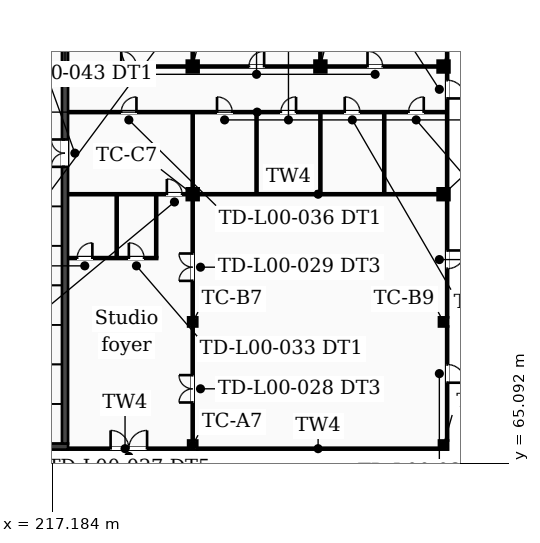
"""IFC4 building model, lengths in metres.
Left out: names, types, materials, properties, quantities, classifications, styles, units other than length and angle.
Written with IfcOpenShell. Run it as: python <this file> out.ifc"""

import sys

from ifc_helpers import new_model, si_unit, direction, frame, frame_2d, origin, origin_2d, place, context, subcontext, project, spatial, rectangle, extrude, element, fill, save


model = new_model("IFC4")
c1 = context("Model", 3, precision=1e-05, world=origin(), true_north=direction((0.0, 1.0)))
c2 = subcontext(c1, "Body", "Model", "MODEL_VIEW")
j1 = project(units=[si_unit("LENGTHUNIT", "METRE"), si_unit("PLANEANGLEUNIT", "RADIAN")], contexts=[c1])
p1 = place(None, origin())
s1 = spatial("IfcSite", under=j1, at=p1, CompositionType="ELEMENT")
p2 = place(p1, origin())
s2 = spatial("IfcBuilding", under=s1, at=p2, CompositionType="ELEMENT")
p3 = place(p2, origin())
s3 = spatial("IfcBuildingStorey", under=s2, at=p3, CompositionType="ELEMENT", Elevation=0.0)
p4 = place(p3, frame((217.8, 66.062, 0.0), z_axis=(0.0, 0.0, 1.0), x_axis=(1.0, 0.0, 0.0)))
e1 = element("IfcWall", 1, at=p4, inside=s3, PredefinedType="PARTITIONING", context=c2, shape_type="SweptSolid", body=[
    extrude(rectangle(XDim=8.3, YDim=0.125, at=frame_2d((4.15, 0.0))), origin(), (0.0, 0.0, 1.0), 8.7),
])
p5 = place(p4, frame((3.2, 0.0, 0.0)))
e2 = element("IfcOpeningElement", 2, at=p5, cuts=e1, PredefinedType="OPENING", context=c2, shape_type="SweptSolid", body=[
    extrude(rectangle(XDim=2.4, YDim=2.4, at=frame_2d((1.2, 1.2))), frame((0.0, 0.073, 0.0), z_axis=(0.0, -1.0, 0.0), x_axis=(1.0, 0.0, 0.0)), (0.0, 0.0, 1.0), 0.145),
])
p6 = place(p3, frame((226.7, 66.062, 0.0), z_axis=(0.0, 0.0, 1.0), x_axis=(1.0, 0.0, 0.0)))
e3 = element("IfcWall", 3, at=p6, inside=s3, PredefinedType="PARTITIONING", context=c2, shape_type="SweptSolid", body=[
    extrude(rectangle(XDim=15.9, YDim=0.125, at=frame_2d((7.95, 0.0))), origin(), (0.0, 0.0, 1.0), 7.5),
])
p7 = place(p3, frame((192.6, 66.2, 0.0), z_axis=(0.0, 0.0, 1.0), x_axis=(1.0, 0.0, 0.0)))
e4 = element("IfcWall", 4, at=p7, inside=s3, PredefinedType="SOLIDWALL", context=c2, shape_type="SweptSolid", body=[
    extrude(rectangle(XDim=25.6, YDim=0.4, at=frame_2d((12.8, 0.0))), origin(), (0.0, 0.0, 1.0), 8.7),
])
p8 = place(p3, frame((218.2, 78.6, 0.0), z_axis=(0.0, 0.0, 1.0), x_axis=(1.0, 0.0, 0.0)))
e5 = element("IfcWall", 5, at=p8, inside=s3, PredefinedType="PARTITIONING", context=c2, shape_type="SweptSolid", body=[
    extrude(rectangle(XDim=5.863, YDim=0.125, at=frame_2d((2.931, 0.0))), origin(), (0.0, 0.0, 1.0), 8.7),
])
p9 = place(p8, frame((0.6, 0.0, 0.0)))
e6 = element("IfcOpeningElement", 6, at=p9, cuts=e5, PredefinedType="OPENING", context=c2, shape_type="SweptSolid", body=[
    extrude(rectangle(XDim=1.0, YDim=2.1, at=frame_2d((0.5, 1.05))), frame((0.0, 0.073, 0.0), z_axis=(0.0, -1.0, 0.0), x_axis=(1.0, 0.0, 0.0)), (0.0, 0.0, 1.0), 0.145),
])
p10 = place(p8, frame((4.0, 0.0, 0.0)))
e7 = element("IfcOpeningElement", 7, at=p10, cuts=e5, PredefinedType="OPENING", context=c2, shape_type="SweptSolid", body=[
    extrude(rectangle(XDim=1.0, YDim=2.1, at=frame_2d((0.5, 1.05))), frame((0.0, 0.073, 0.0), z_axis=(0.0, -1.0, 0.0), x_axis=(1.0, 0.0, 0.0)), (0.0, 0.0, 1.0), 0.145),
])
p11 = place(p3, frame((218.2, 82.8, 0.0), z_axis=(0.0, 0.0, 1.0), x_axis=(1.0, 0.0, 0.0)))
e8 = element("IfcWall", 8, at=p11, inside=s3, PredefinedType="PARTITIONING", context=c2, shape_type="SweptSolid", body=[
    extrude(rectangle(XDim=7.9, YDim=0.125, at=frame_2d((3.95, 0.0))), origin(), (0.0, 0.0, 1.0), 8.7),
])
p12 = place(p11, frame((6.5, 0.0, 0.0)))
e9 = element("IfcOpeningElement", 9, at=p12, cuts=e8, PredefinedType="OPENING", context=c2, shape_type="SweptSolid", body=[
    extrude(rectangle(XDim=1.0, YDim=2.1, at=frame_2d((0.5, 1.05))), frame((0.0, 0.073, 0.0), z_axis=(0.0, -1.0, 0.0), x_axis=(1.0, 0.0, 0.0)), (0.0, 0.0, 1.0), 0.145),
])
p13 = place(p3, frame((226.7, 82.8, 0.0), z_axis=(0.0, 0.0, 1.0), x_axis=(1.0, 0.0, 0.0)))
e10 = element("IfcWall", 10, at=p13, inside=s3, PredefinedType="PARTITIONING", context=c2, shape_type="SweptSolid", body=[
    extrude(rectangle(XDim=15.9, YDim=0.125, at=frame_2d((7.95, 0.0))), origin(), (0.0, 0.0, 1.0), 7.5),
])
p14 = place(p3, frame((218.2, 88.2, 0.0), z_axis=(0.0, 0.0, 1.0), x_axis=(1.0, 0.0, 0.0)))
e11 = element("IfcWall", 11, at=p14, inside=s3, PredefinedType="PARTITIONING", context=c2, shape_type="SweptSolid", body=[
    extrude(rectangle(XDim=24.875, YDim=0.125, at=frame_2d((12.438, 0.0))), origin(), (0.0, 0.0, 1.0), 8.7),
])
p15 = place(p14, frame((3.5, 0.0, 0.0)))
e12 = element("IfcOpeningElement", 12, at=p15, cuts=e11, PredefinedType="OPENING", context=c2, shape_type="SweptSolid", body=[
    extrude(rectangle(XDim=1.0, YDim=2.1, at=frame_2d((0.5, 1.05))), frame((0.0, 0.073, 0.0), z_axis=(0.0, -1.0, 0.0), x_axis=(1.0, 0.0, 0.0)), (0.0, 0.0, 1.0), 0.145),
])
p16 = place(p14, frame((9.8, 0.0, 0.0)))
e13 = element("IfcOpeningElement", 13, at=p16, cuts=e11, PredefinedType="OPENING", context=c2, shape_type="SweptSolid", body=[
    extrude(rectangle(XDim=1.0, YDim=2.1, at=frame_2d((0.5, 1.05))), frame((0.0, 0.073, 0.0), z_axis=(0.0, -1.0, 0.0), x_axis=(1.0, 0.0, 0.0)), (0.0, 0.0, 1.0), 0.145),
])
p17 = place(p14, frame((14.0, 0.0, 0.0)))
e14 = element("IfcOpeningElement", 14, at=p17, cuts=e11, PredefinedType="OPENING", context=c2, shape_type="SweptSolid", body=[
    extrude(rectangle(XDim=1.0, YDim=2.1, at=frame_2d((0.5, 1.05))), frame((0.0, 0.073, 0.0), z_axis=(0.0, -1.0, 0.0), x_axis=(1.0, 0.0, 0.0)), (0.0, 0.0, 1.0), 0.145),
])
p18 = place(p14, frame((18.2, 0.0, 0.0)))
e15 = element("IfcOpeningElement", 15, at=p18, cuts=e11, PredefinedType="OPENING", context=c2, shape_type="SweptSolid", body=[
    extrude(rectangle(XDim=1.0, YDim=2.1, at=frame_2d((0.5, 1.05))), frame((0.0, 0.073, 0.0), z_axis=(0.0, -1.0, 0.0), x_axis=(1.0, 0.0, 0.0)), (0.0, 0.0, 1.0), 0.145),
])
p19 = place(p14, frame((22.4, 0.0, 0.0)))
e16 = element("IfcOpeningElement", 16, at=p19, cuts=e11, PredefinedType="OPENING", context=c2, shape_type="SweptSolid", body=[
    extrude(rectangle(XDim=1.0, YDim=2.1, at=frame_2d((0.5, 1.05))), frame((0.0, 0.073, 0.0), z_axis=(0.0, -1.0, 0.0), x_axis=(1.0, 0.0, 0.0)), (0.0, 0.0, 1.0), 0.145),
])
p20 = place(p3, frame((218.2, 91.2, 0.0), z_axis=(0.0, 0.0, 1.0), x_axis=(1.0, 0.0, 0.0)))
e17 = element("IfcWall", 17, at=p20, inside=s3, PredefinedType="PARTITIONING", context=c2, shape_type="SweptSolid", body=[
    extrude(rectangle(XDim=7.9, YDim=0.125, at=frame_2d((3.95, 0.0))), origin(), (0.0, 0.0, 1.0), 8.7),
])
p21 = place(p20, frame((3.5, 0.0, 0.0)))
e18 = element("IfcOpeningElement", 18, at=p21, cuts=e17, PredefinedType="OPENING", context=c2, shape_type="SweptSolid", body=[
    extrude(rectangle(XDim=1.0, YDim=2.1, at=frame_2d((0.5, 1.05))), frame((0.0, 0.073, 0.0), z_axis=(0.0, -1.0, 0.0), x_axis=(1.0, 0.0, 0.0)), (0.0, 0.0, 1.0), 0.145),
])
p22 = place(p3, frame((226.7, 91.2, 0.0), z_axis=(0.0, 0.0, 1.0), x_axis=(1.0, 0.0, 0.0)))
e19 = element("IfcWall", 19, at=p22, inside=s3, PredefinedType="PARTITIONING", context=c2, shape_type="SweptSolid", body=[
    extrude(rectangle(XDim=7.8, YDim=0.125, at=frame_2d((3.9, 0.0))), origin(), (0.0, 0.0, 1.0), 8.7),
])
p23 = place(p22, frame((3.4, 0.0, 0.0)))
e20 = element("IfcOpeningElement", 20, at=p23, cuts=e19, PredefinedType="OPENING", context=c2, shape_type="SweptSolid", body=[
    extrude(rectangle(XDim=1.0, YDim=2.1, at=frame_2d((0.5, 1.05))), frame((0.0, 0.073, 0.0), z_axis=(0.0, -1.0, 0.0), x_axis=(1.0, 0.0, 0.0)), (0.0, 0.0, 1.0), 0.145),
])
p24 = place(p3, frame((235.1, 91.2, 0.0), z_axis=(0.0, 0.0, 1.0), x_axis=(1.0, 0.0, 0.0)))
e21 = element("IfcWall", 21, at=p24, inside=s3, PredefinedType="PARTITIONING", context=c2, shape_type="SweptSolid", body=[
    extrude(rectangle(XDim=7.5, YDim=0.125, at=frame_2d((3.75, 0.0))), origin(), (0.0, 0.0, 1.0), 8.7),
])
p25 = place(p24, frame((2.8, 0.0, 0.0)))
e22 = element("IfcOpeningElement", 22, at=p25, cuts=e21, PredefinedType="OPENING", context=c2, shape_type="SweptSolid", body=[
    extrude(rectangle(XDim=1.0, YDim=2.1, at=frame_2d((0.5, 1.05))), frame((0.0, 0.073, 0.0), z_axis=(0.0, -1.0, 0.0), x_axis=(1.0, 0.0, 0.0)), (0.0, 0.0, 1.0), 0.145),
])
p26 = place(p3, frame((218.0, 66.4, 0.0), z_axis=(0.0, 0.0, 1.0), x_axis=(0.0, 1.0, 0.0)))
e23 = element("IfcWall", 23, at=p26, inside=s3, PredefinedType="SOLIDWALL", context=c2, shape_type="SweptSolid", body=[
    extrude(rectangle(XDim=49.6, YDim=0.4, at=frame_2d((24.8, 0.0))), origin(), (0.0, 0.0, 1.0), 8.7),
])
p27 = place(p26, frame((18.2, 0.0, 0.0)))
e24 = element("IfcOpeningElement", 24, at=p27, cuts=e23, PredefinedType="OPENING", context=c2, shape_type="SweptSolid", body=[
    extrude(rectangle(XDim=1.8, YDim=2.1, at=frame_2d((0.9, 1.05))), frame((0.0, 0.21, 0.0), z_axis=(0.0, -1.0, 0.0), x_axis=(1.0, 0.0, 0.0)), (0.0, 0.0, 1.0), 0.42),
])
p28 = place(p26, frame((35.7, 0.0, 0.0)))
e25 = element("IfcOpeningElement", 25, at=p28, cuts=e23, PredefinedType="OPENING", context=c2, shape_type="SweptSolid", body=[
    extrude(rectangle(XDim=1.8, YDim=2.1, at=frame_2d((0.9, 1.05))), frame((0.0, 0.21, 0.0), z_axis=(0.0, -1.0, 0.0), x_axis=(1.0, 0.0, 0.0)), (0.0, 0.0, 1.0), 0.42),
])
p29 = place(p26, frame((44.7, 0.0, 0.0)))
e26 = element("IfcOpeningElement", 26, at=p29, cuts=e23, PredefinedType="OPENING", context=c2, shape_type="SweptSolid", body=[
    extrude(rectangle(XDim=1.8, YDim=2.1, at=frame_2d((0.9, 1.05))), frame((0.0, 0.21, 0.0), z_axis=(0.0, -1.0, 0.0), x_axis=(1.0, 0.0, 0.0)), (0.0, 0.0, 1.0), 0.42),
])
for number, where, z_axis, x_axis in (
    (27, (221.4, 78.663, 0.0), (0.0, 0.0, 1.0), (0.0, 1.0, 0.0)),
    (28, (224.0, 78.663, 0.0), (0.0, 0.0, 1.0), (0.0, 1.0, 0.0)),
):
    element("IfcWall", number, at=place(p3, frame(where, z_axis=z_axis, x_axis=x_axis)), inside=s3, PredefinedType="PARTITIONING", context=c2, shape_type="SweptSolid", body=[
        extrude(rectangle(XDim=4.075, YDim=0.125, at=frame_2d((2.038, 0.0))), origin(), (0.0, 0.0, 1.0), 8.7),
    ])
p30 = place(p3, frame((226.4, 66.6, 0.0), z_axis=(0.0, 0.0, 1.0), x_axis=(0.0, 1.0, 0.0)))
e29 = element("IfcWall", 29, at=p30, inside=s3, PredefinedType="PARTITIONING", context=c2, shape_type="SweptSolid", body=[
    extrude(rectangle(XDim=7.5, YDim=0.125, at=frame_2d((3.75, 0.0))), origin(), (0.0, 0.0, 1.0), 8.7),
])
p31 = place(p30, frame((2.5, 0.0, 0.0)))
e30 = element("IfcOpeningElement", 30, at=p31, cuts=e29, PredefinedType="OPENING", context=c2, shape_type="SweptSolid", body=[
    extrude(rectangle(XDim=1.8, YDim=2.1, at=frame_2d((0.9, 1.05))), frame((0.0, 0.073, 0.0), z_axis=(0.0, -1.0, 0.0), x_axis=(1.0, 0.0, 0.0)), (0.0, 0.0, 1.0), 0.145),
])
p32 = place(p3, frame((226.4, 74.7, 0.0), z_axis=(0.0, 0.0, 1.0), x_axis=(0.0, 1.0, 0.0)))
e31 = element("IfcWall", 31, at=p32, inside=s3, PredefinedType="PARTITIONING", context=c2, shape_type="SweptSolid", body=[
    extrude(rectangle(XDim=7.8, YDim=0.125, at=frame_2d((3.9, 0.0))), origin(), (0.0, 0.0, 1.0), 8.7),
])
p33 = place(p32, frame((2.4, 0.0, 0.0)))
e32 = element("IfcOpeningElement", 32, at=p33, cuts=e31, PredefinedType="OPENING", context=c2, shape_type="SweptSolid", body=[
    extrude(rectangle(XDim=1.8, YDim=2.1, at=frame_2d((0.9, 1.05))), frame((0.0, 0.073, 0.0), z_axis=(0.0, -1.0, 0.0), x_axis=(1.0, 0.0, 0.0)), (0.0, 0.0, 1.0), 0.145),
])
p34 = place(p3, frame((226.4, 83.1, 0.0), z_axis=(0.0, 0.0, 1.0), x_axis=(0.0, 1.0, 0.0)))
e33 = element("IfcWall", 33, at=p34, inside=s3, PredefinedType="PARTITIONING", context=c2, shape_type="SweptSolid", body=[
    extrude(rectangle(XDim=5.037, YDim=0.125, at=frame_2d((2.519, 0.0))), origin(), (0.0, 0.0, 1.0), 8.7),
])
p35 = place(p3, frame((226.4, 91.5, 0.0), z_axis=(0.0, 0.0, 1.0), x_axis=(0.0, 1.0, 0.0)))
e34 = element("IfcWall", 34, at=p35, inside=s3, PredefinedType="PARTITIONING", context=c2, shape_type="SweptSolid", body=[
    extrude(rectangle(XDim=7.8, YDim=0.125, at=frame_2d((3.9, 0.0))), origin(), (0.0, 0.0, 1.0), 8.7),
])
for number, where, z_axis, x_axis in (
    (35, (230.6, 82.863, 0.0), (0.0, 0.0, 1.0), (0.0, 1.0, 0.0)),
    (36, (234.8, 82.863, 0.0), (0.0, 0.0, 1.0), (0.0, 1.0, 0.0)),
):
    element("IfcWall", number, at=place(p3, frame(where, z_axis=z_axis, x_axis=x_axis)), inside=s3, PredefinedType="PARTITIONING", context=c2, shape_type="SweptSolid", body=[
        extrude(rectangle(XDim=5.275, YDim=0.125, at=frame_2d((2.637, 0.0))), origin(), (0.0, 0.0, 1.0), 8.7),
    ])
p36 = place(p3, frame((234.8, 91.5, 0.0), z_axis=(0.0, 0.0, 1.0), x_axis=(0.0, 1.0, 0.0)))
e37 = element("IfcWall", 37, at=p36, inside=s3, PredefinedType="PARTITIONING", context=c2, shape_type="SweptSolid", body=[
    extrude(rectangle(XDim=7.975, YDim=0.125, at=frame_2d((3.988, 0.0))), origin(), (0.0, 0.0, 1.0), 8.7),
])
p37 = place(p3, frame((239.0, 82.863, 0.0), z_axis=(0.0, 0.0, 1.0), x_axis=(0.0, 1.0, 0.0)))
e38 = element("IfcWall", 38, at=p37, inside=s3, PredefinedType="PARTITIONING", context=c2, shape_type="SweptSolid", body=[
    extrude(rectangle(XDim=5.275, YDim=0.125, at=frame_2d((2.637, 0.0))), origin(), (0.0, 0.0, 1.0), 8.7),
])
p38 = place(p3, frame((243.137, 74.1, 0.0), z_axis=(0.0, 0.0, 1.0), x_axis=(0.0, -1.0, 0.0)))
e39 = element("IfcWall", 39, at=p38, inside=s3, PredefinedType="PARTITIONING", context=c2, shape_type="SweptSolid", body=[
    extrude(rectangle(XDim=7.5, YDim=0.125, at=frame_2d((3.75, 0.0))), origin(), (0.0, 0.0, 1.0), 8.7),
])
p39 = place(p38, frame((2.5, 0.0, 0.0)))
e40 = element("IfcOpeningElement", 40, at=p39, cuts=e39, PredefinedType="OPENING", context=c2, shape_type="SweptSolid", body=[
    extrude(rectangle(XDim=1.2, YDim=2.1, at=frame_2d((0.6, 1.05))), frame((0.0, 0.073, 0.0), z_axis=(0.0, -1.0, 0.0), x_axis=(1.0, 0.0, 0.0)), (0.0, 0.0, 1.0), 0.145),
])
p40 = place(p3, frame((243.137, 82.5, 0.0), z_axis=(0.0, 0.0, 1.0), x_axis=(0.0, -1.0, 0.0)))
e41 = element("IfcWall", 41, at=p40, inside=s3, PredefinedType="PARTITIONING", context=c2, shape_type="SweptSolid", body=[
    extrude(rectangle(XDim=7.8, YDim=0.125, at=frame_2d((3.9, 0.0))), origin(), (0.0, 0.0, 1.0), 8.7),
])
p41 = place(p40, frame((3.4, 0.0, 0.0)))
e42 = element("IfcOpeningElement", 42, at=p41, cuts=e41, PredefinedType="OPENING", context=c2, shape_type="SweptSolid", body=[
    extrude(rectangle(XDim=1.2, YDim=2.1, at=frame_2d((0.6, 1.05))), frame((0.0, 0.073, 0.0), z_axis=(0.0, -1.0, 0.0), x_axis=(1.0, 0.0, 0.0)), (0.0, 0.0, 1.0), 0.145),
])
p42 = place(p3, frame((243.137, 90.9, 0.0), z_axis=(0.0, 0.0, 1.0), x_axis=(0.0, -1.0, 0.0)))
e43 = element("IfcWall", 43, at=p42, inside=s3, PredefinedType="PARTITIONING", context=c2, shape_type="SweptSolid", body=[
    extrude(rectangle(XDim=7.8, YDim=0.125, at=frame_2d((3.9, 0.0))), origin(), (0.0, 0.0, 1.0), 8.7),
])
p43 = place(p42, frame((0.6, 0.0, 0.0)))
e44 = element("IfcOpeningElement", 44, at=p43, cuts=e43, PredefinedType="OPENING", context=c2, shape_type="SweptSolid", body=[
    extrude(rectangle(XDim=1.2, YDim=2.1, at=frame_2d((0.6, 1.05))), frame((0.0, 0.073, 0.0), z_axis=(0.0, -1.0, 0.0), x_axis=(1.0, 0.0, 0.0)), (0.0, 0.0, 1.0), 0.145),
])
p44 = place(p3, frame((243.137, 91.5, 0.0), z_axis=(0.0, 0.0, 1.0), x_axis=(0.0, 1.0, 0.0)))
e45 = element("IfcWall", 45, at=p44, inside=s3, PredefinedType="PARTITIONING", context=c2, shape_type="SweptSolid", body=[
    extrude(rectangle(XDim=7.8, YDim=0.125, at=frame_2d((3.9, 0.0))), origin(), (0.0, 0.0, 1.0), 8.7),
])
for number, where, z_axis, x_axis in (
    (46, (226.4, 66.3, 0.0), (0.0, 0.0, 1.0), (1.0, 0.0, 0.0)),
    (47, (226.4, 74.4, 0.0), (0.0, 0.0, 1.0), (1.0, 0.0, 0.0)),
    (48, (226.4, 82.8, 0.0), (0.0, 0.0, 1.0), (1.0, 0.0, 0.0)),
    (49, (226.4, 91.2, 0.0), (0.0, 0.0, 1.0), (1.0, 0.0, 0.0)),
    (50, (234.8, 91.2, 0.0), (0.0, 0.0, 1.0), (1.0, 0.0, 0.0)),
    (51, (242.9, 66.3, 0.0), (0.0, 0.0, 1.0), (1.0, 0.0, 0.0)),
    (52, (242.9, 74.4, 0.0), (0.0, 0.0, 1.0), (1.0, 0.0, 0.0)),
    (53, (242.9, 82.8, 0.0), (0.0, 0.0, 1.0), (1.0, 0.0, 0.0)),
    (54, (242.9, 91.2, 0.0), (0.0, 0.0, 1.0), (1.0, 0.0, 0.0)),
):
    element("IfcColumn", number, at=place(p3, frame(where, z_axis=z_axis, x_axis=x_axis)), inside=s3, PredefinedType="COLUMN", context=c2, shape_type="SweptSolid", body=[
        extrude(rectangle(XDim=0.6, YDim=0.6, at=origin_2d()), origin(), (0.0, 0.0, 1.0), 8.7),
    ])
p45 = place(p5, origin())
e55 = element("IfcDoor", 55, at=p45, inside=s3, OperationType="DOUBLE_DOOR_SINGLE_SWING", PredefinedType="DOOR", context=c2, shape_type="SweptSolid", body=[
    extrude(rectangle(XDim=2.4, YDim=2.4, at=frame_2d((1.2, 1.2))), frame((0.0, 0.025, 0.0), z_axis=(0.0, -1.0, 0.0), x_axis=(1.0, 0.0, 0.0)), (0.0, 0.0, 1.0), 0.05),
])
fill(e2, e55)
p46 = place(p31, origin())
e56 = element("IfcDoor", 56, at=p46, inside=s3, OperationType="DOUBLE_DOOR_SINGLE_SWING", PredefinedType="DOOR", context=c2, shape_type="SweptSolid", body=[
    extrude(rectangle(XDim=1.8, YDim=2.1, at=frame_2d((0.9, 1.05))), frame((0.0, 0.025, 0.0), z_axis=(0.0, -1.0, 0.0), x_axis=(1.0, 0.0, 0.0)), (0.0, 0.0, 1.0), 0.05),
])
fill(e30, e56)
p47 = place(p33, origin())
e57 = element("IfcDoor", 57, at=p47, inside=s3, OperationType="DOUBLE_DOOR_SINGLE_SWING", PredefinedType="DOOR", context=c2, shape_type="SweptSolid", body=[
    extrude(rectangle(XDim=1.8, YDim=2.1, at=frame_2d((0.9, 1.05))), frame((0.0, 0.025, 0.0), z_axis=(0.0, -1.0, 0.0), x_axis=(1.0, 0.0, 0.0)), (0.0, 0.0, 1.0), 0.05),
])
fill(e32, e57)
p48 = place(p39, origin())
e58 = element("IfcDoor", 58, at=p48, inside=s3, OperationType="SINGLE_SWING_RIGHT", PredefinedType="DOOR", context=c2, shape_type="SweptSolid", body=[
    extrude(rectangle(XDim=1.2, YDim=2.1, at=frame_2d((0.6, 1.05))), frame((0.0, 0.025, 0.0), z_axis=(0.0, -1.0, 0.0), x_axis=(1.0, 0.0, 0.0)), (0.0, 0.0, 1.0), 0.05),
])
fill(e40, e58)
p49 = place(p41, origin())
e59 = element("IfcDoor", 59, at=p49, inside=s3, OperationType="SINGLE_SWING_LEFT", PredefinedType="DOOR", context=c2, shape_type="SweptSolid", body=[
    extrude(rectangle(XDim=1.2, YDim=2.1, at=frame_2d((0.6, 1.05))), frame((0.0, 0.025, 0.0), z_axis=(0.0, -1.0, 0.0), x_axis=(1.0, 0.0, 0.0)), (0.0, 0.0, 1.0), 0.05),
])
fill(e42, e59)
p50 = place(p9, origin())
e60 = element("IfcDoor", 60, at=p50, inside=s3, OperationType="SINGLE_SWING_RIGHT", PredefinedType="DOOR", context=c2, shape_type="SweptSolid", body=[
    extrude(rectangle(XDim=1.0, YDim=2.1, at=frame_2d((0.5, 1.05))), frame((0.0, 0.025, 0.0), z_axis=(0.0, -1.0, 0.0), x_axis=(1.0, 0.0, 0.0)), (0.0, 0.0, 1.0), 0.05),
])
fill(e6, e60)
p51 = place(p10, origin())
e61 = element("IfcDoor", 61, at=p51, inside=s3, OperationType="SINGLE_SWING_LEFT", PredefinedType="DOOR", context=c2, shape_type="SweptSolid", body=[
    extrude(rectangle(XDim=1.0, YDim=2.1, at=frame_2d((0.5, 1.05))), frame((0.0, 0.025, 0.0), z_axis=(0.0, -1.0, 0.0), x_axis=(1.0, 0.0, 0.0)), (0.0, 0.0, 1.0), 0.05),
])
fill(e7, e61)
p52 = place(p27, origin())
e62 = element("IfcDoor", 62, at=p52, inside=s3, OperationType="DOUBLE_DOOR_SINGLE_SWING", PredefinedType="DOOR", context=c2, shape_type="SweptSolid", body=[
    extrude(rectangle(XDim=1.8, YDim=2.1, at=frame_2d((0.9, 1.05))), frame((0.0, 0.025, 0.0), z_axis=(0.0, -1.0, 0.0), x_axis=(1.0, 0.0, 0.0)), (0.0, 0.0, 1.0), 0.05),
])
fill(e24, e62)
p53 = place(p12, origin())
e63 = element("IfcDoor", 63, at=p53, inside=s3, OperationType="SINGLE_SWING_LEFT", PredefinedType="DOOR", context=c2, shape_type="SweptSolid", body=[
    extrude(rectangle(XDim=1.0, YDim=2.1, at=frame_2d((0.5, 1.05))), frame((0.0, 0.025, 0.0), z_axis=(0.0, -1.0, 0.0), x_axis=(1.0, 0.0, 0.0)), (0.0, 0.0, 1.0), 0.05),
])
fill(e9, e63)
p54 = place(p15, origin())
e64 = element("IfcDoor", 64, at=p54, inside=s3, OperationType="SINGLE_SWING_RIGHT", PredefinedType="DOOR", context=c2, shape_type="SweptSolid", body=[
    extrude(rectangle(XDim=1.0, YDim=2.1, at=frame_2d((0.5, 1.05))), frame((0.0, 0.025, 0.0), z_axis=(0.0, -1.0, 0.0), x_axis=(1.0, 0.0, 0.0)), (0.0, 0.0, 1.0), 0.05),
])
fill(e12, e64)
p55 = place(p16, origin())
e65 = element("IfcDoor", 65, at=p55, inside=s3, OperationType="SINGLE_SWING_LEFT", PredefinedType="DOOR", context=c2, shape_type="SweptSolid", body=[
    extrude(rectangle(XDim=1.0, YDim=2.1, at=frame_2d((0.5, 1.05))), frame((0.0, 0.025, 0.0), z_axis=(0.0, -1.0, 0.0), x_axis=(1.0, 0.0, 0.0)), (0.0, 0.0, 1.0), 0.05),
])
fill(e13, e65)
p56 = place(p17, origin())
e66 = element("IfcDoor", 66, at=p56, inside=s3, OperationType="SINGLE_SWING_RIGHT", PredefinedType="DOOR", context=c2, shape_type="SweptSolid", body=[
    extrude(rectangle(XDim=1.0, YDim=2.1, at=frame_2d((0.5, 1.05))), frame((0.0, 0.025, 0.0), z_axis=(0.0, -1.0, 0.0), x_axis=(1.0, 0.0, 0.0)), (0.0, 0.0, 1.0), 0.05),
])
fill(e14, e66)
p57 = place(p18, origin())
e67 = element("IfcDoor", 67, at=p57, inside=s3, OperationType="SINGLE_SWING_LEFT", PredefinedType="DOOR", context=c2, shape_type="SweptSolid", body=[
    extrude(rectangle(XDim=1.0, YDim=2.1, at=frame_2d((0.5, 1.05))), frame((0.0, 0.025, 0.0), z_axis=(0.0, -1.0, 0.0), x_axis=(1.0, 0.0, 0.0)), (0.0, 0.0, 1.0), 0.05),
])
fill(e15, e67)
p58 = place(p19, origin())
e68 = element("IfcDoor", 68, at=p58, inside=s3, OperationType="SINGLE_SWING_RIGHT", PredefinedType="DOOR", context=c2, shape_type="SweptSolid", body=[
    extrude(rectangle(XDim=1.0, YDim=2.1, at=frame_2d((0.5, 1.05))), frame((0.0, 0.025, 0.0), z_axis=(0.0, -1.0, 0.0), x_axis=(1.0, 0.0, 0.0)), (0.0, 0.0, 1.0), 0.05),
])
fill(e16, e68)
p59 = place(p21, origin())
e69 = element("IfcDoor", 69, at=p59, inside=s3, OperationType="SINGLE_SWING_LEFT", PredefinedType="DOOR", context=c2, shape_type="SweptSolid", body=[
    extrude(rectangle(XDim=1.0, YDim=2.1, at=frame_2d((0.5, 1.05))), frame((0.0, 0.025, 0.0), z_axis=(0.0, -1.0, 0.0), x_axis=(1.0, 0.0, 0.0)), (0.0, 0.0, 1.0), 0.05),
])
fill(e18, e69)
p60 = place(p23, origin())
e70 = element("IfcDoor", 70, at=p60, inside=s3, OperationType="SINGLE_SWING_RIGHT", PredefinedType="DOOR", context=c2, shape_type="SweptSolid", body=[
    extrude(rectangle(XDim=1.0, YDim=2.1, at=frame_2d((0.5, 1.05))), frame((0.0, 0.025, 0.0), z_axis=(0.0, -1.0, 0.0), x_axis=(1.0, 0.0, 0.0)), (0.0, 0.0, 1.0), 0.05),
])
fill(e20, e70)
p61 = place(p25, origin())
e71 = element("IfcDoor", 71, at=p61, inside=s3, OperationType="SINGLE_SWING_LEFT", PredefinedType="DOOR", context=c2, shape_type="SweptSolid", body=[
    extrude(rectangle(XDim=1.0, YDim=2.1, at=frame_2d((0.5, 1.05))), frame((0.0, 0.025, 0.0), z_axis=(0.0, -1.0, 0.0), x_axis=(1.0, 0.0, 0.0)), (0.0, 0.0, 1.0), 0.05),
])
fill(e22, e71)
p62 = place(p43, origin())
e72 = element("IfcDoor", 72, at=p62, inside=s3, OperationType="SINGLE_SWING_RIGHT", PredefinedType="DOOR", context=c2, shape_type="SweptSolid", body=[
    extrude(rectangle(XDim=1.2, YDim=2.1, at=frame_2d((0.6, 1.05))), frame((0.0, 0.025, 0.0), z_axis=(0.0, -1.0, 0.0), x_axis=(1.0, 0.0, 0.0)), (0.0, 0.0, 1.0), 0.05),
])
fill(e44, e72)
save(model, sys.argv[1])
